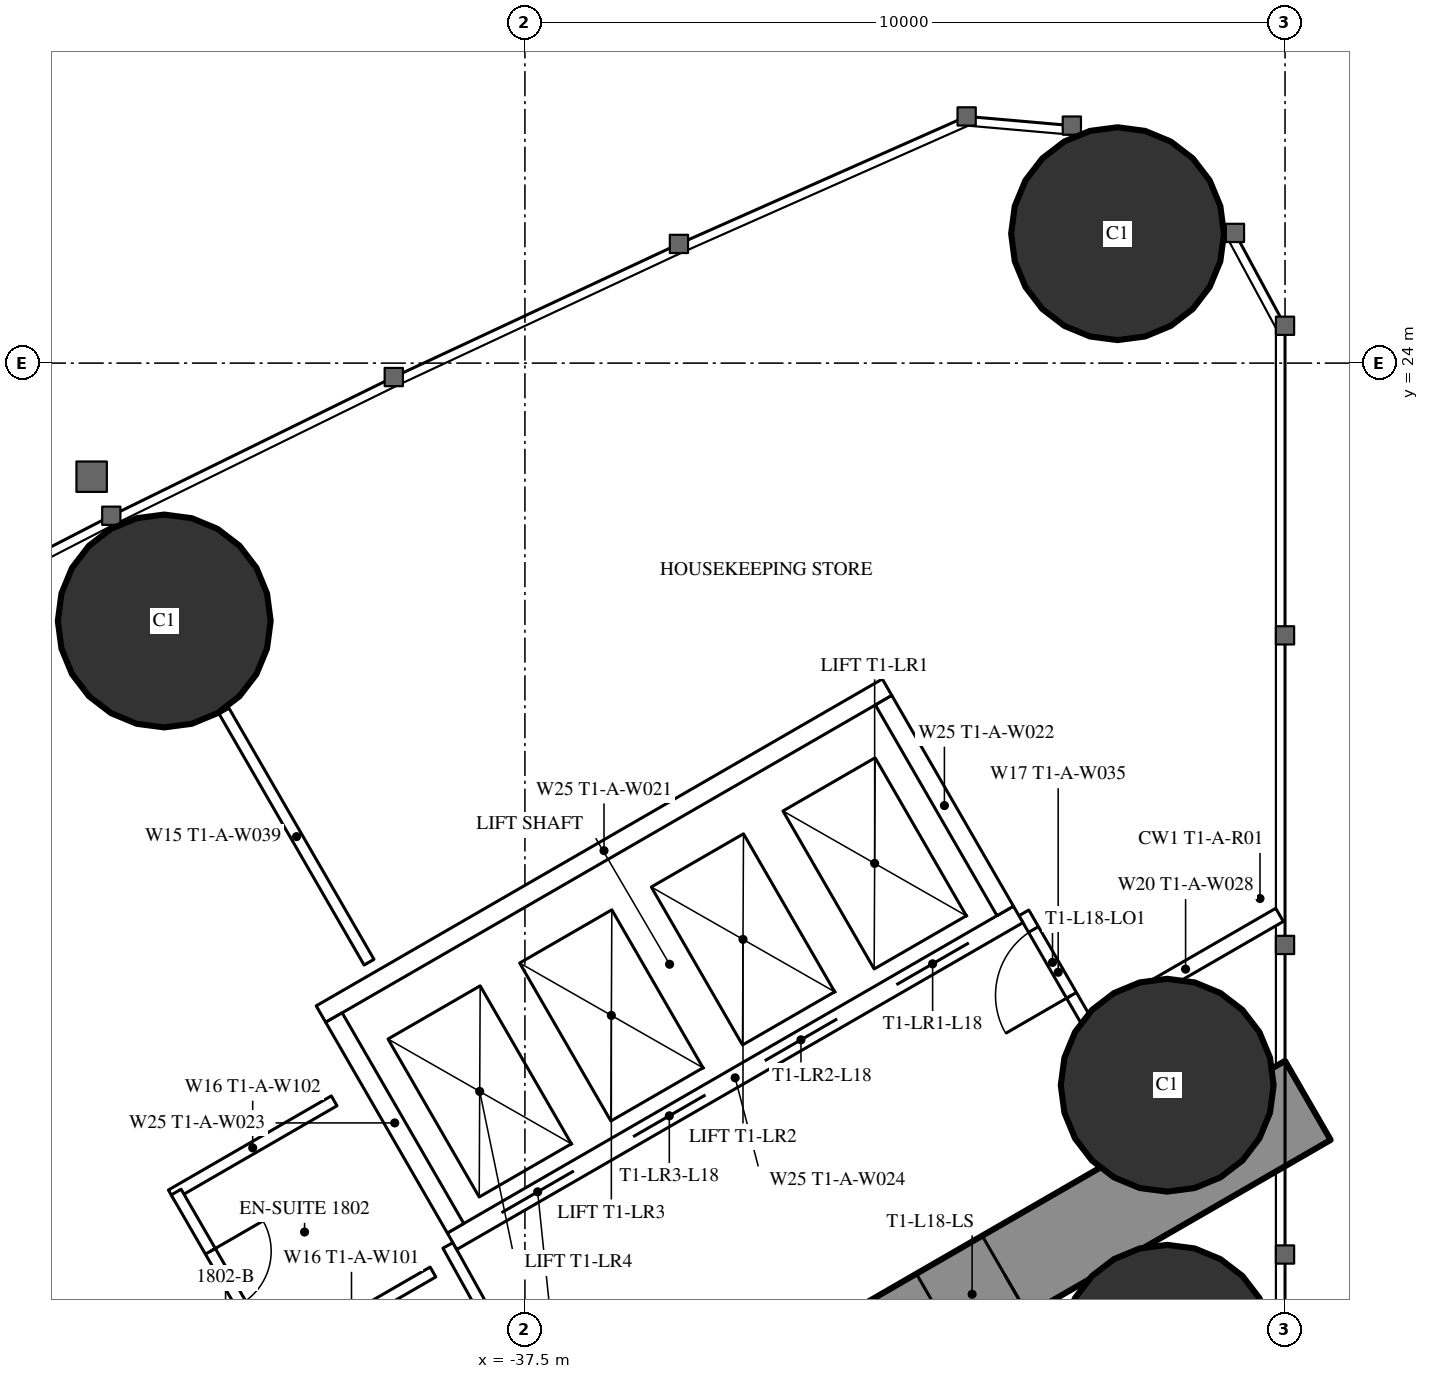
"""IFC4 building model, lengths in metres.
Left out: names, types, materials, properties, quantities, classifications, styles, units other than length and angle.
Written with IfcOpenShell. Run it as: python <this file> out.ifc"""

import sys

from ifc_helpers import new_model, si_unit, direction, frame, frame_2d, origin, origin_2d, place, context, subcontext, project, spatial, rectangle, hollow_circle, extrude, element, fill, save


model = new_model("IFC4")
c1 = context("Model", 3, precision=1e-05, world=origin(), true_north=direction((0.0, 1.0)))
c2 = subcontext(c1, "Body", "Model", "MODEL_VIEW")
j1 = project(units=[si_unit("LENGTHUNIT", "METRE"), si_unit("PLANEANGLEUNIT", "RADIAN")], contexts=[c1])
p1 = place(None, origin())
s1 = spatial("IfcSite", under=j1, at=p1, CompositionType="ELEMENT")
p2 = place(p1, origin())
s2 = spatial("IfcBuilding", under=s1, at=p2, CompositionType="ELEMENT")
p3 = place(p2, frame((0.0, 0.0, 70.5)))
s3 = spatial("IfcBuildingStorey", under=s2, at=p3, CompositionType="ELEMENT", Elevation=70.5)
for number, where, z_axis, x_axis in (
    (1, (-29.703, 25.703, 0.0), (0.0, 0.0, 1.0), (1.0, 0.0, 0.0)),
    (2, (-29.05, 11.0, 0.0), (0.0, 0.0, 1.0), (1.0, 0.0, 0.0)),
    (3, (-29.05, 14.5, 0.0), (0.0, 0.0, 1.0), (1.0, 0.0, 0.0)),
    (4, (-42.245, 20.607, 0.0), (0.0, 0.0, 1.0), (1.0, 0.0, 0.0)),
):
    element("IfcColumn", number, at=place(p3, frame(where, z_axis=z_axis, x_axis=x_axis)), inside=s3, PredefinedType="COLUMN", context=c2, shape_type="SweptSolid", body=[
        extrude(hollow_circle(Radius=1.4, WallThickness=0.12, at=origin_2d()), origin(), (0.0, 0.0, 1.0), 3.5),
    ])
p4 = place(p3, frame((-27.2, 14.3, 0.0), z_axis=(0.0, 0.0, 1.0), x_axis=(-0.866026593062, -0.499997940104, 0.0)))
e5 = element("IfcWall", 5, at=p4, inside=s3, PredefinedType="SHEAR", context=c2, shape_type="SweptSolid", body=[
    extrude(rectangle(XDim=28.946, YDim=1.2, at=frame_2d((14.473, 0.0))), origin(), (0.0, 0.0, 1.0), 3.5),
])
p5 = place(p4, frame((4.6, 0.0, 0.0)))
e6 = element("IfcOpeningElement", 6, at=p5, cuts=e5, PredefinedType="OPENING", context=c2, shape_type="SweptSolid", body=[
    extrude(rectangle(XDim=1.0, YDim=2.2, at=frame_2d((0.5, 1.1))), frame((0.0, 0.61, 0.0), z_axis=(0.0, -1.0, 0.0), x_axis=(1.0, 0.0, 0.0)), (0.0, 0.0, 1.0), 1.22),
])
p6 = place(p4, frame((13.395, 0.0, 0.0)))
e7 = element("IfcOpeningElement", 7, at=p6, cuts=e5, PredefinedType="OPENING", context=c2, shape_type="SweptSolid", body=[
    extrude(rectangle(XDim=1.8, YDim=2.2, at=frame_2d((0.9, 1.1))), frame((0.0, 0.61, 0.0), z_axis=(0.0, -1.0, 0.0), x_axis=(1.0, 0.0, 0.0)), (0.0, 0.0, 1.0), 1.22),
])
p7 = place(p3, frame((-39.551, 16.119, 0.0), z_axis=(0.0, 0.0, 1.0), x_axis=(-0.500014214979, 0.866017196607, 0.0)))
e8 = element("IfcWall", 8, at=p7, inside=s3, PredefinedType="PARTITIONING", context=c2, shape_type="SweptSolid", body=[
    extrude(rectangle(XDim=3.815, YDim=0.15, at=frame_2d((1.907, 0.0))), origin(), (0.0, 0.0, 1.0), 3.25),
])
p8 = place(p3, frame((-27.572, 16.741, 0.0), z_axis=(0.0, 0.0, 1.0), x_axis=(-0.866034618596, -0.499984039138, 0.0)))
e9 = element("IfcWall", 9, at=p8, inside=s3, PredefinedType="PARTITIONING", context=c2, shape_type="SweptSolid", body=[
    extrude(rectangle(XDim=2.854, YDim=0.2, at=frame_2d((1.427, 0.0))), origin(), (0.0, 0.0, 1.0), 3.25),
])
p9 = place(p3, frame((-38.513, 12.392, 0.0), z_axis=(0.0, 0.0, 1.0), x_axis=(0.485585508183, -0.874189175317, 0.0)))
e10 = element("IfcWall", 10, at=p9, inside=s3, PredefinedType="PARTITIONING", context=c2, shape_type="SweptSolid", body=[
    extrude(rectangle(XDim=1.805, YDim=0.15, at=frame_2d((0.902, 0.0))), origin(), (0.0, 0.0, 1.0), 3.25),
])
p10 = place(p3, frame((-30.033, 15.205, 0.0), z_axis=(0.0, 0.0, 1.0), x_axis=(-0.499980071345, 0.866036909293, 0.0)))
e11 = element("IfcWall", 11, at=p10, inside=s3, PredefinedType="PARTITIONING", context=c2, shape_type="SweptSolid", body=[
    extrude(rectangle(XDim=1.805, YDim=0.15, at=frame_2d((0.902, 0.0))), origin(), (0.0, 0.0, 1.0), 3.25),
])
p11 = place(p10, frame((0.552, 0.0, 0.0)))
e12 = element("IfcOpeningElement", 12, at=p11, cuts=e11, PredefinedType="OPENING", context=c2, shape_type="SweptSolid", body=[
    extrude(rectangle(XDim=1.0, YDim=2.2, at=frame_2d((0.5, 1.1))), frame((0.0, 0.085, 0.0), z_axis=(0.0, -1.0, 0.0), x_axis=(1.0, 0.0, 0.0)), (0.0, 0.0, 1.0), 0.17),
])
p12 = place(p3, frame((-40.01, 14.294, 0.0), z_axis=(0.0, 0.0, 1.0), x_axis=(-0.866031185235, -0.4999899861, 0.0)))
e13 = element("IfcWall", 13, at=p12, inside=s3, PredefinedType="PARTITIONING", context=c2, shape_type="SweptSolid", body=[
    extrude(rectangle(XDim=2.475, YDim=0.15, at=frame_2d((1.238, 0.0))), origin(), (0.0, 0.0, 1.0), 3.25),
])
p13 = place(p3, frame((-40.788, 10.843, 0.0), z_axis=(0.0, 0.0, 1.0), x_axis=(-0.500006934395, 0.866021400173, 0.0)))
e14 = element("IfcWall", 14, at=p13, inside=s3, PredefinedType="PARTITIONING", context=c2, shape_type="SweptSolid", body=[
    extrude(rectangle(XDim=2.6, YDim=0.15, at=frame_2d((1.3, 0.0))), origin(), (0.0, 0.0, 1.0), 3.25),
])
p14 = place(p13, frame((0.9, 0.0, 0.0)))
e15 = element("IfcOpeningElement", 15, at=p14, cuts=e14, PredefinedType="OPENING", context=c2, shape_type="SweptSolid", body=[
    extrude(rectangle(XDim=0.8, YDim=2.2, at=frame_2d((0.4, 1.1))), frame((0.0, 0.085, 0.0), z_axis=(0.0, -1.0, 0.0), x_axis=(1.0, 0.0, 0.0)), (0.0, 0.0, 1.0), 0.17),
])
p15 = place(p3, frame((-38.71, 12.042, 0.0), z_axis=(0.0, 0.0, 1.0), x_axis=(-0.86604923931, -0.499958713387, 0.0)))
e16 = element("IfcWall", 16, at=p15, inside=s3, PredefinedType="PARTITIONING", context=c2, shape_type="SweptSolid", body=[
    extrude(rectangle(XDim=2.475, YDim=0.15, at=frame_2d((1.237, 0.0))), origin(), (0.0, 0.0, 1.0), 3.25),
])
p16 = place(p3, frame((-31.01, 16.747, 0.0), z_axis=(0.0, 0.0, 1.0), x_axis=(-0.866028165386, -0.499995216735, 0.0)))
e17 = element("IfcWall", 17, at=p16, inside=s3, PredefinedType="PARTITIONING", context=c2, shape_type="SweptSolid", body=[
    extrude(rectangle(XDim=8.6, YDim=0.25, at=frame_2d((4.3, 0.0))), origin(), (0.0, 0.0, 1.0), 3.25),
])
p17 = place(p16, frame((0.75, 0.0, 0.0)))
e18 = element("IfcOpeningElement", 18, at=p17, cuts=e17, PredefinedType="OPENING", context=c2, shape_type="SweptSolid", body=[
    extrude(rectangle(XDim=1.1, YDim=2.2, at=frame_2d((0.55, 1.1))), frame((0.0, 0.135, 0.0), z_axis=(0.0, -1.0, 0.0), x_axis=(1.0, 0.0, 0.0)), (0.0, 0.0, 1.0), 0.27),
])
p18 = place(p16, frame((2.75, 0.0, 0.0)))
e19 = element("IfcOpeningElement", 19, at=p18, cuts=e17, PredefinedType="OPENING", context=c2, shape_type="SweptSolid", body=[
    extrude(rectangle(XDim=1.1, YDim=2.2, at=frame_2d((0.55, 1.1))), frame((0.0, 0.135, 0.0), z_axis=(0.0, -1.0, 0.0), x_axis=(1.0, 0.0, 0.0)), (0.0, 0.0, 1.0), 0.27),
])
p19 = place(p16, frame((4.75, 0.0, 0.0)))
e20 = element("IfcOpeningElement", 20, at=p19, cuts=e17, PredefinedType="OPENING", context=c2, shape_type="SweptSolid", body=[
    extrude(rectangle(XDim=1.1, YDim=2.2, at=frame_2d((0.55, 1.1))), frame((0.0, 0.135, 0.0), z_axis=(0.0, -1.0, 0.0), x_axis=(1.0, 0.0, 0.0)), (0.0, 0.0, 1.0), 0.27),
])
p20 = place(p16, frame((6.75, 0.0, 0.0)))
e21 = element("IfcOpeningElement", 21, at=p20, cuts=e17, PredefinedType="OPENING", context=c2, shape_type="SweptSolid", body=[
    extrude(rectangle(XDim=1.1, YDim=2.2, at=frame_2d((0.55, 1.1))), frame((0.0, 0.135, 0.0), z_axis=(0.0, -1.0, 0.0), x_axis=(1.0, 0.0, 0.0)), (0.0, 0.0, 1.0), 0.27),
])
p21 = place(p3, frame((-32.736, 19.736, 0.0), z_axis=(0.0, 0.0, 1.0), x_axis=(-0.866028165386, -0.499995216735, 0.0)))
e22 = element("IfcWall", 22, at=p21, inside=s3, PredefinedType="PARTITIONING", context=c2, shape_type="SweptSolid", body=[
    extrude(rectangle(XDim=8.6, YDim=0.25, at=frame_2d((4.3, 0.0))), origin(), (0.0, 0.0, 1.0), 3.25),
])
p22 = place(p3, frame((-31.181, 16.793, 0.0), z_axis=(0.0, 0.0, 1.0), x_axis=(-0.499929347863, 0.866066190972, 0.0)))
e23 = element("IfcWall", 23, at=p22, inside=s3, PredefinedType="PARTITIONING", context=c2, shape_type="SweptSolid", body=[
    extrude(rectangle(XDim=3.201, YDim=0.25, at=frame_2d((1.6, 0.0))), origin(), (0.0, 0.0, 1.0), 3.25),
])
p23 = place(p3, frame((-38.413, 12.618, 0.0), z_axis=(0.0, 0.0, 1.0), x_axis=(-0.499872130319, 0.866099216793, 0.0)))
e24 = element("IfcWall", 24, at=p23, inside=s3, PredefinedType="PARTITIONING", context=c2, shape_type="SweptSolid", body=[
    extrude(rectangle(XDim=3.2, YDim=0.25, at=frame_2d((1.6, 0.0))), origin(), (0.0, 0.0, 1.0), 3.25),
])
p24 = place(p14, origin())
e25 = element("IfcDoor", 25, at=p24, inside=s3, OperationType="SINGLE_SWING_RIGHT", PredefinedType="DOOR", context=c2, shape_type="SweptSolid", body=[
    extrude(rectangle(XDim=0.8, YDim=2.2, at=frame_2d((0.4, 1.1))), frame((0.0, 0.025, 0.0), z_axis=(0.0, -1.0, 0.0), x_axis=(1.0, 0.0, 0.0)), (0.0, 0.0, 1.0), 0.05),
])
fill(e15, e25)
p25 = place(p11, origin())
e26 = element("IfcDoor", 26, at=p25, inside=s3, OperationType="SINGLE_SWING_LEFT", PredefinedType="DOOR", context=c2, shape_type="SweptSolid", body=[
    extrude(rectangle(XDim=1.0, YDim=2.2, at=frame_2d((0.5, 1.1))), frame((0.0, 0.025, 0.0), z_axis=(0.0, -1.0, 0.0), x_axis=(1.0, 0.0, 0.0)), (0.0, 0.0, 1.0), 0.05),
])
fill(e12, e26)
p26 = place(p5, origin())
e27 = element("IfcDoor", 27, at=p26, inside=s3, OperationType="SINGLE_SWING_LEFT", PredefinedType="DOOR", context=c2, shape_type="SweptSolid", body=[
    extrude(rectangle(XDim=1.0, YDim=2.2, at=frame_2d((0.5, 1.1))), frame((0.0, 0.025, 0.0), z_axis=(0.0, -1.0, 0.0), x_axis=(1.0, 0.0, 0.0)), (0.0, 0.0, 1.0), 0.05),
])
fill(e6, e27)
p27 = place(p17, origin())
e28 = element("IfcDoor", 28, at=p27, inside=s3, OperationType="DOUBLE_DOOR_SLIDING", PredefinedType="USERDEFINED", context=c2, shape_type="SweptSolid", body=[
    extrude(rectangle(XDim=1.1, YDim=2.2, at=frame_2d((0.55, 1.1))), frame((0.0, 0.025, 0.0), z_axis=(0.0, -1.0, 0.0), x_axis=(1.0, 0.0, 0.0)), (0.0, 0.0, 1.0), 0.05),
])
fill(e18, e28)
p28 = place(p18, origin())
e29 = element("IfcDoor", 29, at=p28, inside=s3, OperationType="DOUBLE_DOOR_SLIDING", PredefinedType="USERDEFINED", context=c2, shape_type="SweptSolid", body=[
    extrude(rectangle(XDim=1.1, YDim=2.2, at=frame_2d((0.55, 1.1))), frame((0.0, 0.025, 0.0), z_axis=(0.0, -1.0, 0.0), x_axis=(1.0, 0.0, 0.0)), (0.0, 0.0, 1.0), 0.05),
])
fill(e19, e29)
p29 = place(p19, origin())
e30 = element("IfcDoor", 30, at=p29, inside=s3, OperationType="DOUBLE_DOOR_SLIDING", PredefinedType="USERDEFINED", context=c2, shape_type="SweptSolid", body=[
    extrude(rectangle(XDim=1.1, YDim=2.2, at=frame_2d((0.55, 1.1))), frame((0.0, 0.025, 0.0), z_axis=(0.0, -1.0, 0.0), x_axis=(1.0, 0.0, 0.0)), (0.0, 0.0, 1.0), 0.05),
])
fill(e20, e30)
p30 = place(p20, origin())
e31 = element("IfcDoor", 31, at=p30, inside=s3, OperationType="DOUBLE_DOOR_SLIDING", PredefinedType="USERDEFINED", context=c2, shape_type="SweptSolid", body=[
    extrude(rectangle(XDim=1.1, YDim=2.2, at=frame_2d((0.55, 1.1))), frame((0.0, 0.025, 0.0), z_axis=(0.0, -1.0, 0.0), x_axis=(1.0, 0.0, 0.0)), (0.0, 0.0, 1.0), 0.05),
])
fill(e21, e31)
save(model, sys.argv[1])
